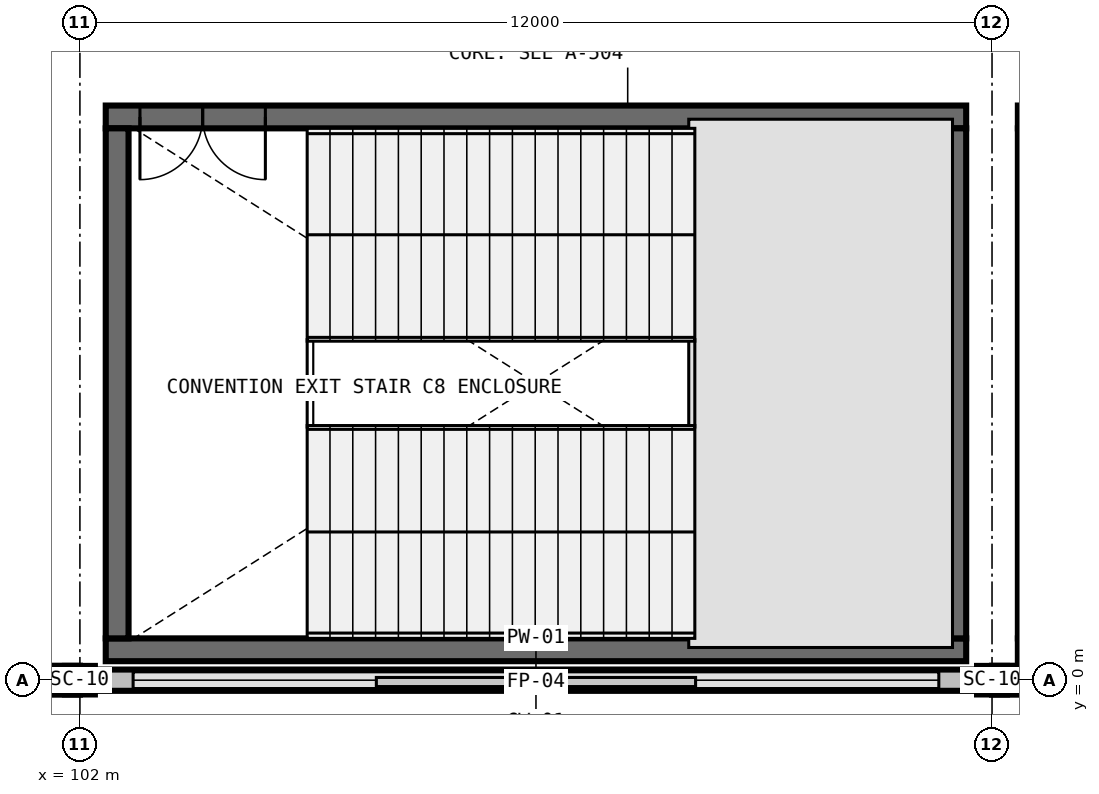
"""IFC4 building model, lengths in metres.
Left out: names, types, materials, properties, quantities, classifications, styles, units other than length and angle.
Written with IfcOpenShell. Run it as: python <this file> out.ifc"""

import sys

from ifc_helpers import new_model, si_unit, direction, frame, frame_2d, origin, origin_2d, place, context, subcontext, project, spatial, rectangle, i_section, extrude, element, fill, save


model = new_model("IFC4")
c1 = context("Model", 3, precision=1e-05, world=origin(), true_north=direction((0.0, 1.0)))
c2 = subcontext(c1, "Body", "Model", "MODEL_VIEW")
j1 = project(units=[si_unit("LENGTHUNIT", "METRE"), si_unit("PLANEANGLEUNIT", "RADIAN")], contexts=[c1])
p1 = place(None, origin())
s1 = spatial("IfcSite", under=j1, at=p1, CompositionType="ELEMENT")
p2 = place(p1, origin())
s2 = spatial("IfcBuilding", under=s1, at=p2, CompositionType="ELEMENT")
p3 = place(p2, frame((0.0, 0.0, 12.0)))
s3 = spatial("IfcBuildingStorey", under=s2, at=p3, CompositionType="ELEMENT", Elevation=12.0)
for number, where, z_axis, x_axis in (
    (1, (102.0, 0.0, 0.0), (0.0, 0.0, 1.0), (1.0, 0.0, 0.0)),
    (2, (114.0, 0.0, 0.0), (0.0, 0.0, 1.0), (1.0, 0.0, 0.0)),
):
    element("IfcColumn", number, at=place(p3, frame(where, z_axis=z_axis, x_axis=x_axis)), inside=s3, PredefinedType="COLUMN", context=c2, shape_type="SweptSolid", body=[
        extrude(i_section(OverallWidth=0.394, OverallDepth=0.375, WebThickness=0.017, FlangeThickness=0.028, FilletRadius=0.031, at=origin_2d()), origin(), (0.0, 0.0, 1.0), 6.0),
    ])
p4 = place(p3, frame((113.66, 0.4, 0.0), z_axis=(0.0, 0.0, 1.0), x_axis=(-1.0, 0.0, 0.0)))
e3 = element("IfcWall", 3, at=p4, inside=s3, PredefinedType="SHEAR", context=c2, shape_type="SweptSolid", body=[
    extrude(rectangle(XDim=11.32, YDim=0.3, at=frame_2d((5.66, 0.0))), origin(), (0.0, 0.0, 1.0), 6.0),
])
p5 = place(p3, frame((113.66, 7.41, 0.0), z_axis=(0.0, 0.0, 1.0), x_axis=(-1.0, 0.0, 0.0)))
e4 = element("IfcWall", 4, at=p5, inside=s3, PredefinedType="SHEAR", context=c2, shape_type="SweptSolid", body=[
    extrude(rectangle(XDim=11.32, YDim=0.3, at=frame_2d((5.66, 0.0))), origin(), (0.0, 0.0, 1.0), 6.0),
])
p6 = place(p5, frame((9.22, 0.0, 0.0)))
e5 = element("IfcOpeningElement", 5, at=p6, cuts=e4, PredefinedType="OPENING", context=c2, shape_type="SweptSolid", body=[
    extrude(rectangle(XDim=1.65, YDim=2.25, at=frame_2d((0.825, 1.125))), frame((0.0, 0.165, 0.0), z_axis=(0.0, -1.0, 0.0), x_axis=(1.0, 0.0, 0.0)), (0.0, 0.0, 1.0), 0.33),
])
for number, where, z_axis, x_axis in (
    (6, (102.49, 7.26, 0.0), (0.0, 0.0, 1.0), (0.0, -1.0, 0.0)),
    (7, (113.51, 0.55, 0.0), (0.0, 0.0, 1.0), (0.0, 1.0, 0.0)),
):
    element("IfcWall", number, at=place(p3, frame(where, z_axis=z_axis, x_axis=x_axis)), inside=s3, PredefinedType="SHEAR", context=c2, shape_type="SweptSolid", body=[
        extrude(rectangle(XDim=6.71, YDim=0.3, at=frame_2d((3.355, 0.0))), origin(), (0.0, 0.0, 1.0), 6.0),
    ])
p7 = place(p3, frame((125.66, 0.4, 0.0), z_axis=(0.0, 0.0, 1.0), x_axis=(-1.0, 0.0, 0.0)))
e8 = element("IfcWall", 8, at=p7, inside=s3, PredefinedType="SHEAR", context=c2, shape_type="SweptSolid", body=[
    extrude(rectangle(XDim=11.32, YDim=0.3, at=frame_2d((5.66, 0.0))), origin(), (0.0, 0.0, 1.0), 6.0),
])
p8 = place(p3, frame((125.66, 7.41, 0.0), z_axis=(0.0, 0.0, 1.0), x_axis=(-1.0, 0.0, 0.0)))
e9 = element("IfcWall", 9, at=p8, inside=s3, PredefinedType="SHEAR", context=c2, shape_type="SweptSolid", body=[
    extrude(rectangle(XDim=11.32, YDim=0.3, at=frame_2d((5.66, 0.0))), origin(), (0.0, 0.0, 1.0), 6.0),
])
p9 = place(p8, frame((9.22, 0.0, 0.0)))
e10 = element("IfcOpeningElement", 10, at=p9, cuts=e9, PredefinedType="OPENING", context=c2, shape_type="SweptSolid", body=[
    extrude(rectangle(XDim=1.65, YDim=2.25, at=frame_2d((0.825, 1.125))), frame((0.0, 0.165, 0.0), z_axis=(0.0, -1.0, 0.0), x_axis=(1.0, 0.0, 0.0)), (0.0, 0.0, 1.0), 0.33),
])
p10 = place(p3, frame((114.49, 7.26, 0.0), z_axis=(0.0, 0.0, 1.0), x_axis=(0.0, -1.0, 0.0)))
e11 = element("IfcWall", 11, at=p10, inside=s3, PredefinedType="SHEAR", context=c2, shape_type="SweptSolid", body=[
    extrude(rectangle(XDim=6.71, YDim=0.3, at=frame_2d((3.355, 0.0))), origin(), (0.0, 0.0, 1.0), 6.0),
])
p11 = place(p3, frame((96.0, 0.0, 0.0), z_axis=(0.0, 0.0, 1.0), x_axis=(1.0, 0.0, 0.0)))
e12 = element("IfcWall", 12, at=p11, inside=s3, PredefinedType="STANDARD", context=c2, shape_type="SweptSolid", body=[
    extrude(rectangle(XDim=6.0, YDim=0.38, at=frame_2d((3.0, 0.0))), origin(), (0.0, 0.0, 1.0), 4.746),
])
p12 = place(p3, frame((102.0, 0.0, 0.0), z_axis=(0.0, 0.0, 1.0), x_axis=(1.0, 0.0, 0.0)))
e13 = element("IfcWall", 13, at=p12, inside=s3, PredefinedType="PARAPET", context=c2, shape_type="SweptSolid", body=[
    extrude(rectangle(XDim=12.0, YDim=0.28, at=frame_2d((6.0, 0.0))), origin(), (0.0, 0.0, 1.0), 0.2),
])
p13 = place(p3, frame((114.0, 0.0, 0.0), z_axis=(0.0, 0.0, 1.0), x_axis=(1.0, 0.0, 0.0)))
e14 = element("IfcWall", 14, at=p13, inside=s3, PredefinedType="STANDARD", context=c2, shape_type="SweptSolid", body=[
    extrude(rectangle(XDim=12.0, YDim=0.38, at=frame_2d((6.0, 0.0))), origin(), (0.0, 0.0, 1.0), 4.746),
])
p14 = place(p13, frame((1.5, 0.0, 0.85)))
e15 = element("IfcOpeningElement", 15, at=p14, cuts=e14, PredefinedType="OPENING", context=c2, shape_type="SweptSolid", body=[
    extrude(rectangle(XDim=2.2, YDim=1.95, at=frame_2d((1.1, 0.975))), frame((0.0, 0.205, 0.0), z_axis=(0.0, -1.0, 0.0), x_axis=(1.0, 0.0, 0.0)), (0.0, 0.0, 1.0), 0.41),
])
p15 = place(p6, origin())
e16 = element("IfcDoor", 16, at=p15, inside=s3, OperationType="DOUBLE_DOOR_SINGLE_SWING", PredefinedType="DOOR", context=c2, shape_type="SweptSolid", body=[
    extrude(rectangle(XDim=1.65, YDim=2.25, at=frame_2d((0.825, 1.125))), frame((0.0, 0.025, 0.0), z_axis=(0.0, -1.0, 0.0), x_axis=(1.0, 0.0, 0.0)), (0.0, 0.0, 1.0), 0.05),
])
fill(e5, e16)
save(model, sys.argv[1])
